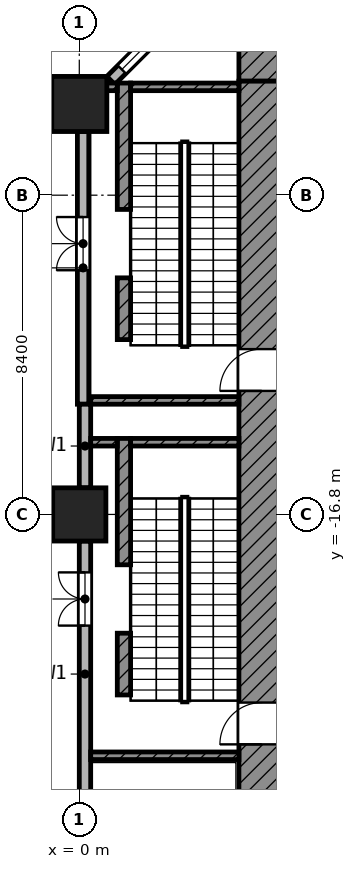
"""IFC4 building model, lengths in metres.
Left out: names, types, materials, properties, quantities, classifications, styles, units other than length and angle.
Written with IfcOpenShell. Run it as: python <this file> out.ifc"""

import sys

from ifc_helpers import new_model, si_unit, direction, frame, frame_2d, origin, origin_2d, place, context, subcontext, project, spatial, rectangle, extrude, element, fill, save


model = new_model("IFC4")
c1 = context("Model", 3, precision=1e-05, world=origin(), true_north=direction((0.0, 1.0)))
c2 = subcontext(c1, "Body", "Model", "MODEL_VIEW")
j1 = project(units=[si_unit("LENGTHUNIT", "METRE"), si_unit("PLANEANGLEUNIT", "RADIAN")], contexts=[c1])
p1 = place(None, origin())
s1 = spatial("IfcSite", under=j1, at=p1, CompositionType="ELEMENT")
p2 = place(p1, origin())
s2 = spatial("IfcBuilding", under=s1, at=p2, CompositionType="ELEMENT")
p3 = place(p2, origin())
s3 = spatial("IfcBuildingStorey", under=s2, at=p3, CompositionType="ELEMENT", Elevation=0.0)
p4 = place(p3, frame((0.0, -6.0, 0.0), z_axis=(0.0, 0.0, 1.0), x_axis=(1.0, 0.0, 0.0)))
e1 = element("IfcColumn", 1, at=p4, inside=s3, PredefinedType="COLUMN", context=c2, shape_type="SweptSolid", body=[
    extrude(rectangle(XDim=1.45, YDim=1.45, at=origin_2d()), origin(), (0.0, 0.0, 1.0), 7.0),
])
p5 = place(p3, frame((0.0, -16.8, 0.0), z_axis=(0.0, 0.0, 1.0), x_axis=(1.0, 0.0, 0.0)))
e2 = element("IfcColumn", 2, at=p5, inside=s3, PredefinedType="COLUMN", context=c2, shape_type="SweptSolid", body=[
    extrude(rectangle(XDim=1.4, YDim=1.4, at=origin_2d()), origin(), (0.0, 0.0, 1.0), 7.0),
])
p6 = place(p3, frame((5.381, -0.831, 0.0), z_axis=(0.0, 0.0, 1.0), x_axis=(-0.707106781187, -0.707106781187, 0.0)))
e3 = element("IfcWall", 3, at=p6, inside=s3, PredefinedType="SOLIDWALL", context=c2, shape_type="SweptSolid", body=[
    extrude(rectangle(XDim=6.435, YDim=0.3, at=frame_2d((3.217, 0.0))), origin(), (0.0, 0.0, 1.0), 5.25),
])
p7 = place(p6, frame((0.409, 0.0, 1.0)))
e4 = element("IfcOpeningElement", 4, at=p7, cuts=e3, PredefinedType="OPENING", context=c2, shape_type="SweptSolid", body=[
    extrude(rectangle(XDim=2.4, YDim=1.8, at=frame_2d((1.2, 0.9))), frame((0.0, 0.16, 0.0), z_axis=(0.0, -1.0, 0.0), x_axis=(1.0, 0.0, 0.0)), (0.0, 0.0, 1.0), 0.32),
])
p8 = place(p6, frame((3.626, 0.0, 1.0)))
e5 = element("IfcOpeningElement", 5, at=p8, cuts=e3, PredefinedType="OPENING", context=c2, shape_type="SweptSolid", body=[
    extrude(rectangle(XDim=2.4, YDim=1.8, at=frame_2d((1.2, 0.9))), frame((0.0, 0.16, 0.0), z_axis=(0.0, -1.0, 0.0), x_axis=(1.0, 0.0, 0.0)), (0.0, 0.0, 1.0), 0.32),
])
p9 = place(p3, frame((0.1, -6.725, 0.0), z_axis=(0.0, 0.0, 1.0), x_axis=(0.0, -1.0, 0.0)))
e6 = element("IfcWall", 6, at=p9, inside=s3, PredefinedType="SOLIDWALL", context=c2, shape_type="SweptSolid", body=[
    extrude(rectangle(XDim=7.175, YDim=0.3, at=frame_2d((3.587, 0.0))), origin(), (0.0, 0.0, 1.0), 5.25),
])
p10 = place(p9, frame((2.25, 0.0, 0.0)))
e7 = element("IfcOpeningElement", 7, at=p10, cuts=e6, PredefinedType="OPENING", context=c2, shape_type="SweptSolid", body=[
    extrude(rectangle(XDim=1.4, YDim=2.1, at=frame_2d((0.7, 1.05))), frame((0.0, 0.16, 0.0), z_axis=(0.0, -1.0, 0.0), x_axis=(1.0, 0.0, 0.0)), (0.0, 0.0, 1.0), 0.32),
])
p11 = place(p3, frame((0.15, -13.9, 0.0), z_axis=(0.0, 0.0, 1.0), x_axis=(0.0, -1.0, 0.0)))
e8 = element("IfcWall", 8, at=p11, inside=s3, PredefinedType="SOLIDWALL", context=c2, shape_type="SweptSolid", body=[
    extrude(rectangle(XDim=2.2, YDim=0.3, at=frame_2d((1.1, 0.0))), origin(), (0.0, 0.0, 1.0), 5.25),
])
p12 = place(p3, frame((0.15, -17.5, 0.0), z_axis=(0.0, 0.0, 1.0), x_axis=(0.0, -1.0, 0.0)))
e9 = element("IfcWall", 9, at=p12, inside=s3, PredefinedType="SOLIDWALL", context=c2, shape_type="SweptSolid", body=[
    extrude(rectangle(XDim=7.0, YDim=0.3, at=frame_2d((3.5, 0.0))), origin(), (0.0, 0.0, 1.0), 5.25),
])
p13 = place(p12, frame((0.825, 0.0, 0.0)))
e10 = element("IfcOpeningElement", 10, at=p13, cuts=e9, PredefinedType="OPENING", context=c2, shape_type="SweptSolid", body=[
    extrude(rectangle(XDim=1.4, YDim=2.1, at=frame_2d((0.7, 1.05))), frame((0.0, 0.16, 0.0), z_axis=(0.0, -1.0, 0.0), x_axis=(1.0, 0.0, 0.0)), (0.0, 0.0, 1.0), 0.32),
])
p14 = place(p3, frame((4.2, -4.8, 0.0), z_axis=(0.0, 0.0, 1.0), x_axis=(1.0, 0.0, 0.0)))
e11 = element("IfcWall", 11, at=p14, inside=s3, PredefinedType="SHEAR", context=c2, shape_type="SweptSolid", body=[
    extrude(rectangle(XDim=21.0, YDim=1.2, at=frame_2d((10.5, 0.0))), origin(), (0.0, 0.0, 1.0), 6.65),
])
p15 = place(p14, frame((1.95, 0.0, 0.0)))
e12 = element("IfcOpeningElement", 12, at=p15, cuts=e11, PredefinedType="OPENING", context=c2, shape_type="SweptSolid", body=[
    extrude(rectangle(XDim=1.1, YDim=2.1, at=frame_2d((0.55, 1.05))), frame((0.0, 0.61, 0.0), z_axis=(0.0, -1.0, 0.0), x_axis=(1.0, 0.0, 0.0)), (0.0, 0.0, 1.0), 1.22),
])
p16 = place(p14, frame((17.95, 0.0, 0.0)))
e13 = element("IfcOpeningElement", 13, at=p16, cuts=e11, PredefinedType="OPENING", context=c2, shape_type="SweptSolid", body=[
    extrude(rectangle(XDim=1.1, YDim=2.1, at=frame_2d((0.55, 1.05))), frame((0.0, 0.61, 0.0), z_axis=(0.0, -1.0, 0.0), x_axis=(1.0, 0.0, 0.0)), (0.0, 0.0, 1.0), 1.22),
])
p17 = place(p3, frame((4.8, -25.2, 0.0), z_axis=(0.0, 0.0, 1.0), x_axis=(0.0, 1.0, 0.0)))
e14 = element("IfcWall", 14, at=p17, inside=s3, PredefinedType="SHEAR", context=c2, shape_type="SweptSolid", body=[
    extrude(rectangle(XDim=19.8, YDim=1.2, at=frame_2d((9.9, 0.0))), origin(), (0.0, 0.0, 1.0), 6.65),
])
p18 = place(p17, frame((11.65, 0.0, 0.0)))
e15 = element("IfcOpeningElement", 15, at=p18, cuts=e14, PredefinedType="OPENING", context=c2, shape_type="SweptSolid", body=[
    extrude(rectangle(XDim=1.1, YDim=2.1, at=frame_2d((0.55, 1.05))), frame((0.0, 0.61, 0.0), z_axis=(0.0, -1.0, 0.0), x_axis=(1.0, 0.0, 0.0)), (0.0, 0.0, 1.0), 1.22),
])
p19 = place(p17, frame((2.35, 0.0, 0.0)))
e16 = element("IfcOpeningElement", 16, at=p19, cuts=e14, PredefinedType="OPENING", context=c2, shape_type="SweptSolid", body=[
    extrude(rectangle(XDim=1.1, YDim=2.1, at=frame_2d((0.55, 1.05))), frame((0.0, 0.61, 0.0), z_axis=(0.0, -1.0, 0.0), x_axis=(1.0, 0.0, 0.0)), (0.0, 0.0, 1.0), 1.22),
])
p20 = place(p3, frame((1.175, -8.775, 0.0), z_axis=(0.0, 0.0, 1.0), x_axis=(0.0, 1.0, 0.0)))
e17 = element("IfcWall", 17, at=p20, inside=s3, PredefinedType="SHEAR", context=c2, shape_type="SweptSolid", body=[
    extrude(rectangle(XDim=3.325, YDim=0.35, at=frame_2d((1.663, 0.0))), origin(), (0.0, 0.0, 1.0), 6.65),
])
p21 = place(p3, frame((1.175, -12.2, 0.0), z_axis=(0.0, 0.0, 1.0), x_axis=(0.0, 1.0, 0.0)))
e18 = element("IfcWall", 18, at=p21, inside=s3, PredefinedType="SHEAR", context=c2, shape_type="SweptSolid", body=[
    extrude(rectangle(XDim=1.625, YDim=0.35, at=frame_2d((0.812, 0.0))), origin(), (0.0, 0.0, 1.0), 6.65),
])
p22 = place(p3, frame((0.3, -5.55, 0.0), z_axis=(0.0, 0.0, 1.0), x_axis=(1.0, 0.0, 0.0)))
e19 = element("IfcWall", 19, at=p22, inside=s3, PredefinedType="SHEAR", context=c2, shape_type="SweptSolid", body=[
    extrude(rectangle(XDim=0.7, YDim=0.2, at=frame_2d((0.35, 0.0))), origin(), (0.0, 0.0, 1.0), 6.65),
])
p23 = place(p3, frame((1.35, -5.55, 0.0), z_axis=(0.0, 0.0, 1.0), x_axis=(1.0, 0.0, 0.0)))
e20 = element("IfcWall", 20, at=p23, inside=s3, PredefinedType="SHEAR", context=c2, shape_type="SweptSolid", body=[
    extrude(rectangle(XDim=2.85, YDim=0.2, at=frame_2d((1.425, 0.0))), origin(), (0.0, 0.0, 1.0), 6.65),
])
p24 = place(p3, frame((0.3, -13.8, 0.0), z_axis=(0.0, 0.0, 1.0), x_axis=(1.0, 0.0, 0.0)))
e21 = element("IfcWall", 21, at=p24, inside=s3, PredefinedType="SHEAR", context=c2, shape_type="SweptSolid", body=[
    extrude(rectangle(XDim=3.9, YDim=0.2, at=frame_2d((1.95, 0.0))), origin(), (0.0, 0.0, 1.0), 6.65),
])
p25 = place(p3, frame((1.175, -18.125, 0.0), z_axis=(0.0, 0.0, 1.0), x_axis=(0.0, 1.0, 0.0)))
e22 = element("IfcWall", 22, at=p25, inside=s3, PredefinedType="SHEAR", context=c2, shape_type="SweptSolid", body=[
    extrude(rectangle(XDim=3.325, YDim=0.35, at=frame_2d((1.663, 0.0))), origin(), (0.0, 0.0, 1.0), 6.65),
])
p26 = place(p3, frame((1.175, -21.55, 0.0), z_axis=(0.0, 0.0, 1.0), x_axis=(0.0, 1.0, 0.0)))
e23 = element("IfcWall", 23, at=p26, inside=s3, PredefinedType="SHEAR", context=c2, shape_type="SweptSolid", body=[
    extrude(rectangle(XDim=1.625, YDim=0.35, at=frame_2d((0.812, 0.0))), origin(), (0.0, 0.0, 1.0), 6.65),
])
p27 = place(p3, frame((0.3, -14.9, 0.0), z_axis=(0.0, 0.0, 1.0), x_axis=(1.0, 0.0, 0.0)))
e24 = element("IfcWall", 24, at=p27, inside=s3, PredefinedType="SHEAR", context=c2, shape_type="SweptSolid", body=[
    extrude(rectangle(XDim=0.7, YDim=0.2, at=frame_2d((0.35, 0.0))), origin(), (0.0, 0.0, 1.0), 6.65),
])
p28 = place(p3, frame((1.35, -14.9, 0.0), z_axis=(0.0, 0.0, 1.0), x_axis=(1.0, 0.0, 0.0)))
e25 = element("IfcWall", 25, at=p28, inside=s3, PredefinedType="SHEAR", context=c2, shape_type="SweptSolid", body=[
    extrude(rectangle(XDim=2.85, YDim=0.2, at=frame_2d((1.425, 0.0))), origin(), (0.0, 0.0, 1.0), 6.65),
])
p29 = place(p3, frame((0.3, -23.15, 0.0), z_axis=(0.0, 0.0, 1.0), x_axis=(1.0, 0.0, 0.0)))
e26 = element("IfcWall", 26, at=p29, inside=s3, PredefinedType="SHEAR", context=c2, shape_type="SweptSolid", body=[
    extrude(rectangle(XDim=3.9, YDim=0.2, at=frame_2d((1.95, 0.0))), origin(), (0.0, 0.0, 1.0), 6.65),
])
p30 = place(p8, origin())
e27 = element("IfcWindow", 27, at=p30, inside=s3, PartitioningType="SINGLE_PANEL", PredefinedType="WINDOW", context=c2, shape_type="SweptSolid", body=[
    extrude(rectangle(XDim=2.4, YDim=1.8, at=frame_2d((1.2, 0.9))), frame((0.0, 0.03, 0.0), z_axis=(0.0, -1.0, 0.0), x_axis=(1.0, 0.0, 0.0)), (0.0, 0.0, 1.0), 0.06),
])
fill(e5, e27)
p31 = place(p10, frame((1.4, 0.0, 0.0), z_axis=(0.0, 0.0, 1.0), x_axis=(-1.0, 0.0, 0.0)))
e28 = element("IfcDoor", 28, at=p31, inside=s3, OperationType="DOUBLE_DOOR_SINGLE_SWING", PredefinedType="DOOR", context=c2, shape_type="SweptSolid", body=[
    extrude(rectangle(XDim=1.4, YDim=2.1, at=frame_2d((0.7, 1.05))), frame((0.0, 0.025, 0.0), z_axis=(0.0, -1.0, 0.0), x_axis=(1.0, 0.0, 0.0)), (0.0, 0.0, 1.0), 0.05),
])
fill(e7, e28)
p32 = place(p13, frame((1.4, 0.0, 0.0), z_axis=(0.0, 0.0, 1.0), x_axis=(-1.0, 0.0, 0.0)))
e29 = element("IfcDoor", 29, at=p32, inside=s3, OperationType="DOUBLE_DOOR_SINGLE_SWING", PredefinedType="DOOR", context=c2, shape_type="SweptSolid", body=[
    extrude(rectangle(XDim=1.4, YDim=2.1, at=frame_2d((0.7, 1.05))), frame((0.0, 0.025, 0.0), z_axis=(0.0, -1.0, 0.0), x_axis=(1.0, 0.0, 0.0)), (0.0, 0.0, 1.0), 0.05),
])
fill(e10, e29)
p33 = place(p18, origin())
e30 = element("IfcDoor", 30, at=p33, inside=s3, OperationType="SINGLE_SWING_LEFT", PredefinedType="DOOR", context=c2, shape_type="SweptSolid", body=[
    extrude(rectangle(XDim=1.1, YDim=2.1, at=frame_2d((0.55, 1.05))), frame((0.0, 0.025, 0.0), z_axis=(0.0, -1.0, 0.0), x_axis=(1.0, 0.0, 0.0)), (0.0, 0.0, 1.0), 0.05),
])
fill(e15, e30)
p34 = place(p19, origin())
e31 = element("IfcDoor", 31, at=p34, inside=s3, OperationType="SINGLE_SWING_LEFT", PredefinedType="DOOR", context=c2, shape_type="SweptSolid", body=[
    extrude(rectangle(XDim=1.1, YDim=2.1, at=frame_2d((0.55, 1.05))), frame((0.0, 0.025, 0.0), z_axis=(0.0, -1.0, 0.0), x_axis=(1.0, 0.0, 0.0)), (0.0, 0.0, 1.0), 0.05),
])
fill(e16, e31)
save(model, sys.argv[1])
